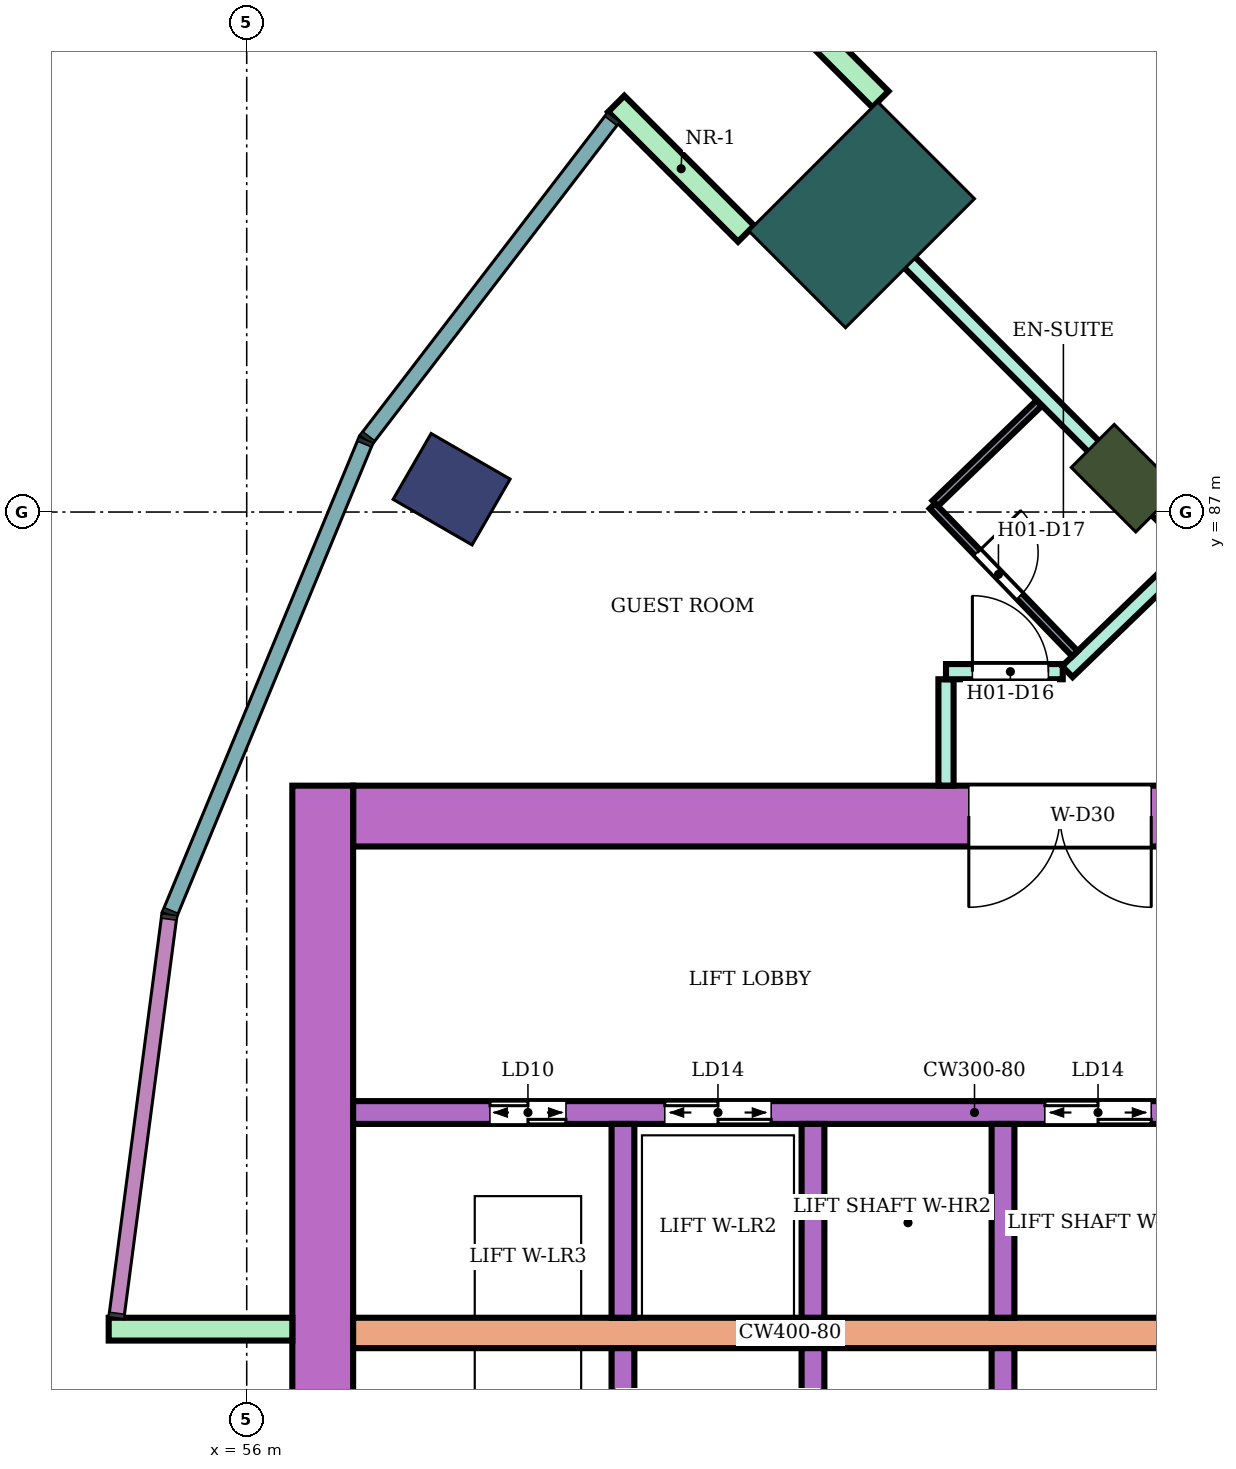
"""IFC4 building model, lengths in metres.
Left out: names, types, materials, properties, quantities, classifications, styles, units other than length and angle.
Written with IfcOpenShell. Run it as: python <this file> out.ifc"""

import sys

from ifc_helpers import new_model, si_unit, direction, frame, frame_2d, origin, origin_2d, place, context, subcontext, project, spatial, rectangle, extrude, element, fill, save


model = new_model("IFC4")
c1 = context("Model", 3, precision=1e-05, world=origin(), true_north=direction((0.0, 1.0)))
c2 = subcontext(c1, "Body", "Model", "MODEL_VIEW")
j1 = project(units=[si_unit("LENGTHUNIT", "METRE"), si_unit("PLANEANGLEUNIT", "RADIAN")], contexts=[c1])
p1 = place(None, origin())
s1 = spatial("IfcSite", under=j1, at=p1, CompositionType="ELEMENT")
p2 = place(p1, origin())
s2 = spatial("IfcBuilding", under=s1, at=p2, CompositionType="ELEMENT")
p3 = place(p2, frame((0.0, 0.0, 36.4)))
s3 = spatial("IfcBuildingStorey", under=s2, at=p3, CompositionType="ELEMENT", Elevation=36.4)
p4 = place(p3, frame((58.696, 87.3, 0.0), z_axis=(0.0, 0.0, 1.0), x_axis=(-0.866025403784, 0.5, 0.0)))
e1 = element("IfcColumn", 1, at=p4, inside=s3, PredefinedType="COLUMN", context=c2, shape_type="SweptSolid", body=[
    extrude(rectangle(XDim=1.2, YDim=1.0, at=origin_2d()), origin(), (0.0, 0.0, 1.0), 3.8),
])
p5 = place(p3, frame((67.555, 87.445, 0.0), z_axis=(0.0, 0.0, 1.0), x_axis=(-0.707106781187, 0.707106781187, 0.0)))
e2 = element("IfcColumn", 2, at=p5, inside=s3, PredefinedType="COLUMN", context=c2, shape_type="SweptSolid", body=[
    extrude(rectangle(XDim=1.2, YDim=0.8, at=origin_2d()), origin(), (0.0, 0.0, 1.0), 3.8),
])
p6 = place(p3, frame((64.09, 90.91, 0.0), z_axis=(0.0, 0.0, 1.0), x_axis=(-0.707106781187, 0.707106781187, 0.0)))
e3 = element("IfcColumn", 3, at=p6, inside=s3, PredefinedType="COLUMN", context=c2, shape_type="SweptSolid", body=[
    extrude(rectangle(XDim=1.8, YDim=2.4, at=origin_2d()), origin(), (0.0, 0.0, 1.0), 3.8),
])
p7 = place(p3, frame((72.1, 83.0, 0.0), z_axis=(0.0, 0.0, 1.0), x_axis=(-1.0, 0.0, 0.0)))
e4 = element("IfcWall", 4, at=p7, inside=s3, PredefinedType="SHEAR", context=c2, shape_type="SweptSolid", body=[
    extrude(rectangle(XDim=14.7, YDim=0.8, at=frame_2d((7.35, 0.0))), origin(), (0.0, 0.0, 1.0), 3.48),
])
p8 = place(p7, frame((4.2, 0.0, 0.0)))
e5 = element("IfcOpeningElement", 5, at=p8, cuts=e4, PredefinedType="OPENING", context=c2, shape_type="SweptSolid", body=[
    extrude(rectangle(XDim=2.4, YDim=2.4, at=frame_2d((1.2, 1.2))), frame((0.0, 0.41, 0.0), z_axis=(0.0, -1.0, 0.0), x_axis=(1.0, 0.0, 0.0)), (0.0, 0.0, 1.0), 0.82),
])
p9 = place(p3, frame((57.0, 83.4, 0.0), z_axis=(0.0, 0.0, 1.0), x_axis=(0.0, -1.0, 0.0)))
e6 = element("IfcWall", 6, at=p9, inside=s3, PredefinedType="SHEAR", context=c2, shape_type="SweptSolid", body=[
    extrude(rectangle(XDim=16.8, YDim=0.8, at=frame_2d((8.4, 0.0))), origin(), (0.0, 0.0, 1.0), 3.48),
])
p10 = place(p3, frame((68.3, 76.2, 0.0), z_axis=(0.0, 0.0, 1.0), x_axis=(-1.0, 0.0, 0.0)))
e7 = element("IfcWall", 7, at=p10, inside=s3, PredefinedType="SHEAR", context=c2, shape_type="SweptSolid", body=[
    extrude(rectangle(XDim=10.9, YDim=0.4, at=frame_2d((5.45, 0.0))), origin(), (0.0, 0.0, 1.0), 3.48),
])
p11 = place(p3, frame((68.3, 79.1, 0.0), z_axis=(0.0, 0.0, 1.0), x_axis=(-1.0, 0.0, 0.0)))
e8 = element("IfcWall", 8, at=p11, inside=s3, PredefinedType="SHEAR", context=c2, shape_type="SweptSolid", body=[
    extrude(rectangle(XDim=10.9, YDim=0.3, at=frame_2d((5.45, 0.0))), origin(), (0.0, 0.0, 1.0), 3.48),
])
p12 = place(p11, frame((0.4, 0.0, 0.0)))
e9 = element("IfcOpeningElement", 9, at=p12, cuts=e8, PredefinedType="OPENING", context=c2, shape_type="SweptSolid", body=[
    extrude(rectangle(XDim=1.4, YDim=2.1, at=frame_2d((0.7, 1.05))), frame((0.0, 0.16, 0.0), z_axis=(0.0, -1.0, 0.0), x_axis=(1.0, 0.0, 0.0)), (0.0, 0.0, 1.0), 0.32),
])
p13 = place(p11, frame((5.4, 0.0, 0.0)))
e10 = element("IfcOpeningElement", 10, at=p13, cuts=e8, PredefinedType="OPENING", context=c2, shape_type="SweptSolid", body=[
    extrude(rectangle(XDim=1.4, YDim=2.1, at=frame_2d((0.7, 1.05))), frame((0.0, 0.16, 0.0), z_axis=(0.0, -1.0, 0.0), x_axis=(1.0, 0.0, 0.0)), (0.0, 0.0, 1.0), 0.32),
])
p14 = place(p11, frame((8.1, 0.0, 0.0)))
e11 = element("IfcOpeningElement", 11, at=p14, cuts=e8, PredefinedType="OPENING", context=c2, shape_type="SweptSolid", body=[
    extrude(rectangle(XDim=1.0, YDim=2.1, at=frame_2d((0.5, 1.05))), frame((0.0, 0.16, 0.0), z_axis=(0.0, -1.0, 0.0), x_axis=(1.0, 0.0, 0.0)), (0.0, 0.0, 1.0), 0.32),
])
for number, where, z_axis, x_axis in (
    (12, (65.95, 76.0, 0.0), (0.0, 0.0, 1.0), (0.0, -1.0, 0.0)),
    (13, (63.45, 76.0, 0.0), (0.0, 0.0, 1.0), (0.0, -1.0, 0.0)),
    (14, (60.95, 76.0, 0.0), (0.0, 0.0, 1.0), (0.0, -1.0, 0.0)),
    (15, (65.95, 78.95, 0.0), (0.0, 0.0, 1.0), (0.0, -1.0, 0.0)),
    (16, (63.45, 78.95, 0.0), (0.0, 0.0, 1.0), (0.0, -1.0, 0.0)),
    (17, (60.95, 78.95, 0.0), (0.0, 0.0, 1.0), (0.0, -1.0, 0.0)),
):
    element("IfcWall", number, at=place(p3, frame(where, z_axis=z_axis, x_axis=x_axis)), inside=s3, PredefinedType="SHEAR", context=c2, shape_type="SweptSolid", body=[
        extrude(rectangle(XDim=2.55, YDim=0.3, at=frame_2d((1.275, 0.0))), origin(), (0.0, 0.0, 1.0), 3.48),
    ])
for number, where, z_axis, x_axis in (
    (18, (64.338, 92.43, 0.0), (0.0, 0.0, 1.0), (-0.707, 0.707, 0.0)),
    (19, (62.57, 90.662, 0.0), (0.0, 0.0, 1.0), (-0.707, 0.707, 0.0)),
    (20, (56.6, 76.25, 0.0), (0.0, 0.0, 1.0), (-1.0, 0.0, 0.0)),
):
    element("IfcWall", number, at=place(p3, frame(where, z_axis=z_axis, x_axis=x_axis)), inside=s3, PredefinedType="NOTDEFINED", context=c2, shape_type="SweptSolid", body=[
        extrude(rectangle(XDim=2.416, YDim=0.3, at=frame_2d((1.208, 0.0))), origin(), (0.0, 0.0, 1.0), 3.8),
    ])
p15 = place(p3, frame((63.599, 91.408, 0.0), z_axis=(0.0, 0.0, 1.0), x_axis=(0.706981017422, -0.707232522587, 0.0)))
e21 = element("IfcWall", 21, at=p15, inside=s3, PredefinedType="PARTITIONING", context=c2, shape_type="SweptSolid", body=[
    extrude(rectangle(XDim=6.795, YDim=0.2, at=frame_2d((3.397, 0.0))), origin(), (0.0, 0.0, 1.0), 3.35),
])
p16 = place(p3, frame((65.2, 83.401, 0.0), z_axis=(0.0, 0.0, 1.0), x_axis=(0.0, 1.0, 0.0)))
e22 = element("IfcWall", 22, at=p16, inside=s3, PredefinedType="PARTITIONING", context=c2, shape_type="SweptSolid", body=[
    extrude(rectangle(XDim=1.399, YDim=0.2, at=frame_2d((0.7, 0.0))), origin(), (0.0, 0.0, 1.0), 3.35),
])
p17 = place(p3, frame((65.2, 84.9, 0.0), z_axis=(0.0, 0.0, 1.0), x_axis=(1.0, 0.0, 0.0)))
e23 = element("IfcWall", 23, at=p17, inside=s3, PredefinedType="PARTITIONING", context=c2, shape_type="SweptSolid", body=[
    extrude(rectangle(XDim=1.536, YDim=0.2, at=frame_2d((0.768, 0.0))), origin(), (0.0, 0.0, 1.0), 3.35),
])
p18 = place(p17, frame((0.347, 0.0, 0.0)))
e24 = element("IfcOpeningElement", 24, at=p18, cuts=e23, PredefinedType="OPENING", context=c2, shape_type="SweptSolid", body=[
    extrude(rectangle(XDim=1.0, YDim=2.1, at=frame_2d((0.5, 1.05))), frame((0.0, 0.11, 0.0), z_axis=(0.0, -1.0, 0.0), x_axis=(1.0, 0.0, 0.0)), (0.0, 0.0, 1.0), 0.22),
])
p19 = place(p3, frame((66.796, 84.9, 0.0), z_axis=(0.0, 0.0, 1.0), x_axis=(0.719690131178, 0.694295409092, 0.0)))
e25 = element("IfcWall", 25, at=p19, inside=s3, PredefinedType="PARTITIONING", context=c2, shape_type="SweptSolid", body=[
    extrude(rectangle(XDim=6.585, YDim=0.2, at=frame_2d((3.293, 0.0))), origin(), (0.0, 0.0, 1.0), 3.35),
])
p20 = place(p19, frame((2.867, 0.0, 0.0)))
e26 = element("IfcOpeningElement", 26, at=p20, cuts=e25, PredefinedType="OPENING", context=c2, shape_type="SweptSolid", body=[
    extrude(rectangle(XDim=1.0, YDim=2.1, at=frame_2d((0.5, 1.05))), frame((0.0, 0.11, 0.0), z_axis=(0.0, -1.0, 0.0), x_axis=(1.0, 0.0, 0.0)), (0.0, 0.0, 1.0), 0.22),
])
p21 = place(p3, frame((67.102, 97.342, 0.0), z_axis=(0.0, 0.0, 1.0), x_axis=(0.499944680089, -0.866057340394, 0.0)))
e27 = element("IfcWall", 27, at=p21, inside=s3, PredefinedType="PARTITIONING", context=c2, shape_type="SweptSolid", body=[
    extrude(rectangle(XDim=8.908, YDim=0.2, at=frame_2d((4.454, 0.0))), origin(), (0.0, 0.0, 1.0), 3.35),
])
p22 = place(p3, frame((65.058, 87.114, 0.0), z_axis=(0.0, 0.0, 1.0), x_axis=(0.719715847356, 0.694268751324, 0.0)))
e28 = element("IfcWall", 28, at=p22, inside=s3, PredefinedType="PARTITIONING", context=c2, shape_type="SweptSolid", body=[
    extrude(rectangle(XDim=1.9, YDim=0.1, at=frame_2d((0.95, 0.0))), origin(), (0.0, 0.0, 1.0), 3.35),
])
p23 = place(p3, frame((65.022, 87.079, 0.0), z_axis=(0.0, 0.0, 1.0), x_axis=(0.694287838235, -0.719697434815, 0.0)))
e29 = element("IfcWall", 29, at=p23, inside=s3, PredefinedType="PARTITIONING", context=c2, shape_type="SweptSolid", body=[
    extrude(rectangle(XDim=2.7, YDim=0.1, at=frame_2d((1.35, 0.0))), origin(), (0.0, 0.0, 1.0), 3.35),
])
p24 = place(p23, frame((0.85, 0.0, 0.0)))
e30 = element("IfcOpeningElement", 30, at=p24, cuts=e29, PredefinedType="OPENING", context=c2, shape_type="SweptSolid", body=[
    extrude(rectangle(XDim=0.8, YDim=2.1, at=frame_2d((0.4, 1.05))), frame((0.0, 0.06, 0.0), z_axis=(0.0, -1.0, 0.0), x_axis=(1.0, 0.0, 0.0)), (0.0, 0.0, 1.0), 0.12),
])
p25 = place(p18, origin())
e31 = element("IfcDoor", 31, at=p25, inside=s3, OperationType="SINGLE_SWING_LEFT", PredefinedType="DOOR", context=c2, shape_type="SweptSolid", body=[
    extrude(rectangle(XDim=1.0, YDim=2.1, at=frame_2d((0.5, 1.05))), frame((0.0, 0.025, 0.0), z_axis=(0.0, -1.0, 0.0), x_axis=(1.0, 0.0, 0.0)), (0.0, 0.0, 1.0), 0.05),
])
fill(e24, e31)
p26 = place(p24, origin())
e32 = element("IfcDoor", 32, at=p26, inside=s3, OperationType="SINGLE_SWING_LEFT", PredefinedType="DOOR", context=c2, shape_type="SweptSolid", body=[
    extrude(rectangle(XDim=0.8, YDim=2.1, at=frame_2d((0.4, 1.05))), frame((0.0, 0.025, 0.0), z_axis=(0.0, -1.0, 0.0), x_axis=(1.0, 0.0, 0.0)), (0.0, 0.0, 1.0), 0.05),
])
fill(e30, e32)
p27 = place(p12, origin())
e33 = element("IfcDoor", 33, at=p27, inside=s3, OperationType="DOUBLE_DOOR_SLIDING", PredefinedType="DOOR", context=c2, shape_type="SweptSolid", body=[
    extrude(rectangle(XDim=1.4, YDim=2.1, at=frame_2d((0.7, 1.05))), frame((0.0, 0.025, 0.0), z_axis=(0.0, -1.0, 0.0), x_axis=(1.0, 0.0, 0.0)), (0.0, 0.0, 1.0), 0.05),
])
fill(e9, e33)
p28 = place(p13, origin())
e34 = element("IfcDoor", 34, at=p28, inside=s3, OperationType="DOUBLE_DOOR_SLIDING", PredefinedType="DOOR", context=c2, shape_type="SweptSolid", body=[
    extrude(rectangle(XDim=1.4, YDim=2.1, at=frame_2d((0.7, 1.05))), frame((0.0, 0.025, 0.0), z_axis=(0.0, -1.0, 0.0), x_axis=(1.0, 0.0, 0.0)), (0.0, 0.0, 1.0), 0.05),
])
fill(e10, e34)
p29 = place(p14, origin())
e35 = element("IfcDoor", 35, at=p29, inside=s3, OperationType="DOUBLE_DOOR_SLIDING", PredefinedType="DOOR", context=c2, shape_type="SweptSolid", body=[
    extrude(rectangle(XDim=1.0, YDim=2.1, at=frame_2d((0.5, 1.05))), frame((0.0, 0.025, 0.0), z_axis=(0.0, -1.0, 0.0), x_axis=(1.0, 0.0, 0.0)), (0.0, 0.0, 1.0), 0.05),
])
fill(e11, e35)
p30 = place(p8, origin())
e36 = element("IfcDoor", 36, at=p30, inside=s3, OperationType="DOUBLE_DOOR_SINGLE_SWING", PredefinedType="DOOR", context=c2, shape_type="SweptSolid", body=[
    extrude(rectangle(XDim=2.4, YDim=2.4, at=frame_2d((1.2, 1.2))), frame((0.0, 0.025, 0.0), z_axis=(0.0, -1.0, 0.0), x_axis=(1.0, 0.0, 0.0)), (0.0, 0.0, 1.0), 0.05),
])
fill(e5, e36)
save(model, sys.argv[1])
